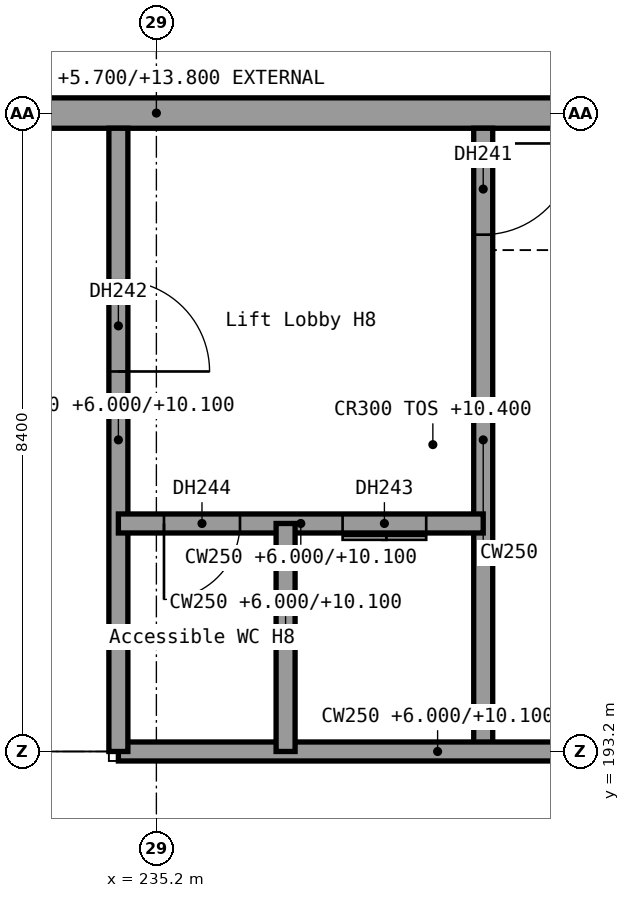
"""IFC4 building model, lengths in metres.
Left out: names, types, materials, properties, quantities, classifications, styles, units other than length and angle.
Written with IfcOpenShell. Run it as: python <this file> out.ifc"""

import sys

from ifc_helpers import new_model, si_unit, direction, frame, frame_2d, origin, place, context, subcontext, project, spatial, rectangle, extrude, element, fill, save


model = new_model("IFC4")
c1 = context("Model", 3, precision=1e-05, world=origin(), true_north=direction((0.0, 1.0)))
c2 = subcontext(c1, "Body", "Model", "MODEL_VIEW")
j1 = project(units=[si_unit("LENGTHUNIT", "METRE"), si_unit("PLANEANGLEUNIT", "RADIAN")], contexts=[c1])
p1 = place(None, origin())
s1 = spatial("IfcSite", under=j1, at=p1, CompositionType="ELEMENT")
p2 = place(p1, origin())
s2 = spatial("IfcBuilding", under=s1, at=p2, CompositionType="ELEMENT")
p3 = place(p2, frame((0.0, 0.0, 6.0)))
s3 = spatial("IfcBuildingStorey", under=s2, at=p3, CompositionType="ELEMENT", Elevation=6.0)
p4 = place(p3, frame((227.3, 201.6, -0.3), z_axis=(0.0, 0.0, 1.0), x_axis=(1.0, 0.0, 0.0)))
e1 = element("IfcWall", 1, at=p4, inside=s3, PredefinedType="STANDARD", context=c2, shape_type="SweptSolid", body=[
    extrude(rectangle(XDim=15.8, YDim=0.4, at=frame_2d((7.9, 0.0))), origin(), (0.0, 0.0, 1.0), 8.1),
])
p5 = place(p3, frame((239.5, 201.4, 0.0), z_axis=(0.0, 0.0, 1.0), x_axis=(0.0, -1.0, 0.0)))
e2 = element("IfcWall", 2, at=p5, inside=s3, PredefinedType="SHEAR", context=c2, shape_type="SweptSolid", body=[
    extrude(rectangle(XDim=8.2, YDim=0.25, at=frame_2d((4.1, 0.0))), origin(), (0.0, 0.0, 1.0), 4.1),
])
p6 = place(p5, frame((0.2, 0.0, 0.0)))
e3 = element("IfcOpeningElement", 3, at=p6, cuts=e2, PredefinedType="OPENING", context=c2, shape_type="SweptSolid", body=[
    extrude(rectangle(XDim=1.2, YDim=2.1, at=frame_2d((0.6, 1.05))), frame((0.0, 0.125, 0.0), z_axis=(0.0, -1.0, 0.0), x_axis=(1.0, 0.0, 0.0)), (0.0, 0.0, 1.0), 0.25),
])
p7 = place(p3, frame((243.1, 193.2, 0.0), z_axis=(0.0, 0.0, 1.0), x_axis=(-1.0, 0.0, 0.0)))
e4 = element("IfcWall", 4, at=p7, inside=s3, PredefinedType="SHEAR", context=c2, shape_type="SweptSolid", body=[
    extrude(rectangle(XDim=8.4, YDim=0.25, at=frame_2d((4.2, 0.0))), origin(), (0.0, 0.0, 1.0), 4.1),
])
p8 = place(p3, frame((234.7, 201.4, 0.0), z_axis=(0.0, 0.0, 1.0), x_axis=(0.0, -1.0, 0.0)))
e5 = element("IfcWall", 5, at=p8, inside=s3, PredefinedType="SHEAR", context=c2, shape_type="SweptSolid", body=[
    extrude(rectangle(XDim=8.2, YDim=0.25, at=frame_2d((4.1, 0.0))), origin(), (0.0, 0.0, 1.0), 4.1),
])
p9 = place(p8, frame((2.0, 0.0, 0.0)))
e6 = element("IfcOpeningElement", 6, at=p9, cuts=e5, PredefinedType="OPENING", context=c2, shape_type="SweptSolid", body=[
    extrude(rectangle(XDim=1.2, YDim=2.1, at=frame_2d((0.6, 1.05))), frame((0.0, 0.125, 0.0), z_axis=(0.0, -1.0, 0.0), x_axis=(1.0, 0.0, 0.0)), (0.0, 0.0, 1.0), 0.25),
])
p10 = place(p3, frame((239.5, 196.2, 0.0), z_axis=(0.0, 0.0, 1.0), x_axis=(-1.0, 0.0, 0.0)))
e7 = element("IfcWall", 7, at=p10, inside=s3, PredefinedType="SHEAR", context=c2, shape_type="SweptSolid", body=[
    extrude(rectangle(XDim=4.8, YDim=0.25, at=frame_2d((2.4, 0.0))), origin(), (0.0, 0.0, 1.0), 4.1),
])
p11 = place(p10, frame((0.75, 0.0, 0.0)))
e8 = element("IfcOpeningElement", 8, at=p11, cuts=e7, PredefinedType="OPENING", context=c2, shape_type="SweptSolid", body=[
    extrude(rectangle(XDim=1.1, YDim=2.1, at=frame_2d((0.55, 1.05))), frame((0.0, 0.125, 0.0), z_axis=(0.0, -1.0, 0.0), x_axis=(1.0, 0.0, 0.0)), (0.0, 0.0, 1.0), 0.25),
])
p12 = place(p10, frame((3.2, 0.0, 0.0)))
e9 = element("IfcOpeningElement", 9, at=p12, cuts=e7, PredefinedType="OPENING", context=c2, shape_type="SweptSolid", body=[
    extrude(rectangle(XDim=1.0, YDim=2.1, at=frame_2d((0.5, 1.05))), frame((0.0, 0.125, 0.0), z_axis=(0.0, -1.0, 0.0), x_axis=(1.0, 0.0, 0.0)), (0.0, 0.0, 1.0), 0.25),
])
p13 = place(p3, frame((236.9, 196.2, 0.0), z_axis=(0.0, 0.0, 1.0), x_axis=(0.0, -1.0, 0.0)))
e10 = element("IfcWall", 10, at=p13, inside=s3, PredefinedType="SHEAR", context=c2, shape_type="SweptSolid", body=[
    extrude(rectangle(XDim=3.0, YDim=0.25, at=frame_2d((1.5, 0.0))), origin(), (0.0, 0.0, 1.0), 4.1),
])
p14 = place(p6, origin())
e11 = element("IfcDoor", 11, at=p14, inside=s3, OperationType="SINGLE_SWING_LEFT", PredefinedType="DOOR", context=c2, shape_type="SweptSolid", body=[
    extrude(rectangle(XDim=1.2, YDim=2.1, at=frame_2d((0.6, 1.05))), frame((0.0, 0.025, 0.0), z_axis=(0.0, -1.0, 0.0), x_axis=(1.0, 0.0, 0.0)), (0.0, 0.0, 1.0), 0.05),
])
fill(e3, e11)
p15 = place(p9, origin())
e12 = element("IfcDoor", 12, at=p15, inside=s3, OperationType="SINGLE_SWING_LEFT", PredefinedType="DOOR", context=c2, shape_type="SweptSolid", body=[
    extrude(rectangle(XDim=1.2, YDim=2.1, at=frame_2d((0.6, 1.05))), frame((0.0, 0.025, 0.0), z_axis=(0.0, -1.0, 0.0), x_axis=(1.0, 0.0, 0.0)), (0.0, 0.0, 1.0), 0.05),
])
fill(e6, e12)
p16 = place(p11, origin())
e13 = element("IfcDoor", 13, at=p16, inside=s3, OperationType="DOUBLE_DOOR_SLIDING", PredefinedType="DOOR", context=c2, shape_type="SweptSolid", body=[
    extrude(rectangle(XDim=1.1, YDim=2.1, at=frame_2d((0.55, 1.05))), frame((0.0, 0.025, 0.0), z_axis=(0.0, -1.0, 0.0), x_axis=(1.0, 0.0, 0.0)), (0.0, 0.0, 1.0), 0.05),
])
fill(e8, e13)
p17 = place(p12, origin())
e14 = element("IfcDoor", 14, at=p17, inside=s3, OperationType="SINGLE_SWING_RIGHT", PredefinedType="DOOR", context=c2, shape_type="SweptSolid", body=[
    extrude(rectangle(XDim=1.0, YDim=2.1, at=frame_2d((0.5, 1.05))), frame((0.0, 0.025, 0.0), z_axis=(0.0, -1.0, 0.0), x_axis=(1.0, 0.0, 0.0)), (0.0, 0.0, 1.0), 0.05),
])
fill(e9, e14)
save(model, sys.argv[1])
